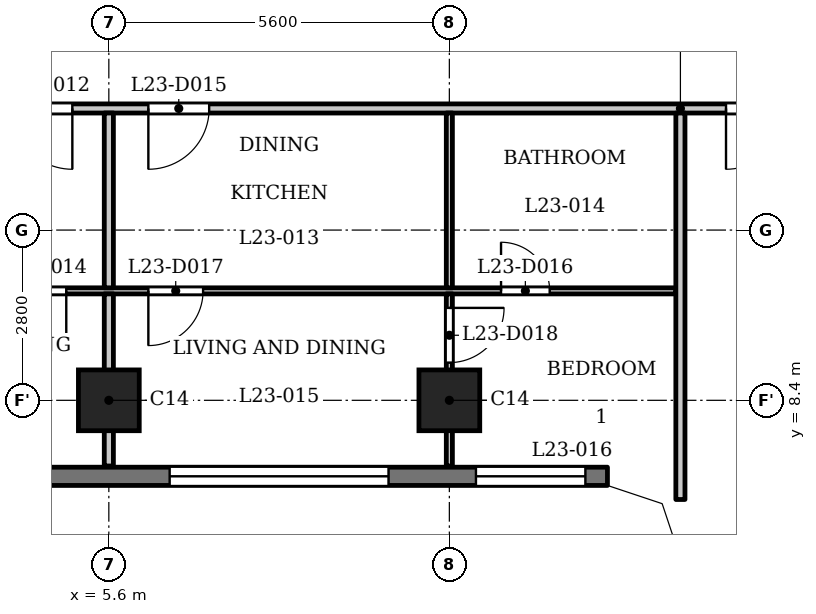
"""IFC4 building model, lengths in metres.
Left out: names, types, materials, properties, quantities, classifications, styles, units other than length and angle.
Written with IfcOpenShell. Run it as: python <this file> out.ifc"""

import sys

from ifc_helpers import new_model, si_unit, direction, frame, frame_2d, origin, origin_2d, place, context, subcontext, project, spatial, polyline, rectangle, outline, extrude, element, fill, save


model = new_model("IFC4")
c1 = context("Model", 3, precision=1e-05, world=origin(), true_north=direction((0.0, 1.0)))
c2 = subcontext(c1, "Body", "Model", "MODEL_VIEW")
j1 = project(units=[si_unit("LENGTHUNIT", "METRE"), si_unit("PLANEANGLEUNIT", "RADIAN")], contexts=[c1])
p1 = place(None, origin())
s1 = spatial("IfcSite", under=j1, at=p1, CompositionType="ELEMENT")
p2 = place(p1, origin())
s2 = spatial("IfcBuilding", under=s1, at=p2, CompositionType="ELEMENT")
p3 = place(p2, frame((0.0, 0.0, 93.8)))
s3 = spatial("IfcBuildingStorey", under=s2, at=p3, CompositionType="ELEMENT", Elevation=93.8)
for number, where, z_axis, x_axis in (
    (1, (5.6, 8.4, 0.0), (0.0, 0.0, 1.0), (1.0, 0.0, 0.0)),
    (2, (11.2, 8.4, 0.0), (0.0, 0.0, 1.0), (1.0, 0.0, 0.0)),
):
    element("IfcColumn", number, at=place(p3, frame(where, z_axis=z_axis, x_axis=x_axis)), inside=s3, PredefinedType="COLUMN", context=c2, shape_type="SweptSolid", body=[
        extrude(rectangle(XDim=1.0, YDim=1.0, at=origin_2d()), origin(), (0.0, 0.0, 1.0), 3.5),
    ])
p4 = place(p3, frame((-13.8, 7.15, 0.0), z_axis=(0.0, 0.0, 1.0), x_axis=(1.0, 0.0, 0.0)))
e3 = element("IfcWall", 3, at=p4, inside=s3, PredefinedType="SOLIDWALL", context=c2, shape_type="SweptSolid", body=[
    extrude(rectangle(XDim=27.6, YDim=0.3, at=frame_2d((13.8, 0.0))), origin(), (0.0, 0.0, 1.0), 3.2),
])
p5 = place(p4, frame((0.363, 0.0, 0.9)))
e4 = element("IfcOpeningElement", 4, at=p5, cuts=e3, PredefinedType="OPENING", context=c2, shape_type="SweptSolid", body=[
    extrude(rectangle(XDim=1.8, YDim=1.25, at=frame_2d((0.9, 0.625))), frame((0.0, 0.16, 0.0), z_axis=(0.0, -1.0, 0.0), x_axis=(1.0, 0.0, 0.0)), (0.0, 0.0, 1.0), 0.32),
])
p6 = place(p4, frame((3.6, 0.0, 1.2)))
e5 = element("IfcOpeningElement", 5, at=p6, cuts=e3, PredefinedType="OPENING", context=c2, shape_type="SweptSolid", body=[
    extrude(rectangle(XDim=3.6, YDim=0.95, at=frame_2d((1.8, 0.475))), frame((0.0, 0.16, 0.0), z_axis=(0.0, -1.0, 0.0), x_axis=(1.0, 0.0, 0.0)), (0.0, 0.0, 1.0), 0.32),
])
p7 = place(p4, frame((9.2, 0.0, 1.2)))
e6 = element("IfcOpeningElement", 6, at=p7, cuts=e3, PredefinedType="OPENING", context=c2, shape_type="SweptSolid", body=[
    extrude(rectangle(XDim=3.6, YDim=0.95, at=frame_2d((1.8, 0.475))), frame((0.0, 0.16, 0.0), z_axis=(0.0, -1.0, 0.0), x_axis=(1.0, 0.0, 0.0)), (0.0, 0.0, 1.0), 0.32),
])
p8 = place(p4, frame((14.8, 0.0, 1.2)))
e7 = element("IfcOpeningElement", 7, at=p8, cuts=e3, PredefinedType="OPENING", context=c2, shape_type="SweptSolid", body=[
    extrude(rectangle(XDim=3.6, YDim=0.95, at=frame_2d((1.8, 0.475))), frame((0.0, 0.16, 0.0), z_axis=(0.0, -1.0, 0.0), x_axis=(1.0, 0.0, 0.0)), (0.0, 0.0, 1.0), 0.32),
])
p9 = place(p4, frame((20.4, 0.0, 1.2)))
e8 = element("IfcOpeningElement", 8, at=p9, cuts=e3, PredefinedType="OPENING", context=c2, shape_type="SweptSolid", body=[
    extrude(rectangle(XDim=3.6, YDim=0.95, at=frame_2d((1.8, 0.475))), frame((0.0, 0.16, 0.0), z_axis=(0.0, -1.0, 0.0), x_axis=(1.0, 0.0, 0.0)), (0.0, 0.0, 1.0), 0.32),
])
p10 = place(p4, frame((25.438, 0.0, 0.9)))
e9 = element("IfcOpeningElement", 9, at=p10, cuts=e3, PredefinedType="OPENING", context=c2, shape_type="SweptSolid", body=[
    extrude(rectangle(XDim=1.8, YDim=1.25, at=frame_2d((0.9, 0.625))), frame((0.0, 0.16, 0.0), z_axis=(0.0, -1.0, 0.0), x_axis=(1.0, 0.0, 0.0)), (0.0, 0.0, 1.0), 0.32),
])
p11 = place(p3, frame((-14.925, 10.2, 0.0), z_axis=(0.0, 0.0, 1.0), x_axis=(1.0, 0.0, 0.0)))
e10 = element("IfcWall", 10, at=p11, inside=s3, PredefinedType="PARTITIONING", context=c2, shape_type="SweptSolid", body=[
    extrude(rectangle(XDim=29.85, YDim=0.1, at=frame_2d((14.925, 0.0))), origin(), (0.0, 0.0, 1.0), 3.2),
])
p12 = place(p11, frame((0.525, 0.0, 0.0)))
e11 = element("IfcOpeningElement", 11, at=p12, cuts=e10, PredefinedType="OPENING", context=c2, shape_type="SweptSolid", body=[
    extrude(rectangle(XDim=0.8, YDim=2.1, at=frame_2d((0.4, 1.05))), frame((0.0, 0.06, 0.0), z_axis=(0.0, -1.0, 0.0), x_axis=(1.0, 0.0, 0.0)), (0.0, 0.0, 1.0), 0.12),
])
p13 = place(p11, frame((4.375, 0.0, 0.0)))
e12 = element("IfcOpeningElement", 12, at=p13, cuts=e10, PredefinedType="OPENING", context=c2, shape_type="SweptSolid", body=[
    extrude(rectangle(XDim=0.9, YDim=2.1, at=frame_2d((0.45, 1.05))), frame((0.0, 0.06, 0.0), z_axis=(0.0, -1.0, 0.0), x_axis=(1.0, 0.0, 0.0)), (0.0, 0.0, 1.0), 0.12),
])
p14 = place(p11, frame((10.125, 0.0, 0.0)))
e13 = element("IfcOpeningElement", 13, at=p14, cuts=e10, PredefinedType="OPENING", context=c2, shape_type="SweptSolid", body=[
    extrude(rectangle(XDim=0.8, YDim=2.1, at=frame_2d((0.4, 1.05))), frame((0.0, 0.06, 0.0), z_axis=(0.0, -1.0, 0.0), x_axis=(1.0, 0.0, 0.0)), (0.0, 0.0, 1.0), 0.12),
])
p15 = place(p11, frame((12.975, 0.0, 0.0)))
e14 = element("IfcOpeningElement", 14, at=p15, cuts=e10, PredefinedType="OPENING", context=c2, shape_type="SweptSolid", body=[
    extrude(rectangle(XDim=0.9, YDim=2.1, at=frame_2d((0.45, 1.05))), frame((0.0, 0.06, 0.0), z_axis=(0.0, -1.0, 0.0), x_axis=(1.0, 0.0, 0.0)), (0.0, 0.0, 1.0), 0.12),
])
p16 = place(p11, frame((16.075, 0.0, 0.0)))
e15 = element("IfcOpeningElement", 15, at=p16, cuts=e10, PredefinedType="OPENING", context=c2, shape_type="SweptSolid", body=[
    extrude(rectangle(XDim=0.8, YDim=2.1, at=frame_2d((0.4, 1.05))), frame((0.0, 0.06, 0.0), z_axis=(0.0, -1.0, 0.0), x_axis=(1.0, 0.0, 0.0)), (0.0, 0.0, 1.0), 0.12),
])
p17 = place(p11, frame((18.925, 0.0, 0.0)))
e16 = element("IfcOpeningElement", 16, at=p17, cuts=e10, PredefinedType="OPENING", context=c2, shape_type="SweptSolid", body=[
    extrude(rectangle(XDim=0.9, YDim=2.1, at=frame_2d((0.45, 1.05))), frame((0.0, 0.06, 0.0), z_axis=(0.0, -1.0, 0.0), x_axis=(1.0, 0.0, 0.0)), (0.0, 0.0, 1.0), 0.12),
])
p18 = place(p11, frame((26.975, 0.0, 0.0)))
e17 = element("IfcOpeningElement", 17, at=p18, cuts=e10, PredefinedType="OPENING", context=c2, shape_type="SweptSolid", body=[
    extrude(rectangle(XDim=0.8, YDim=2.1, at=frame_2d((0.4, 1.05))), frame((0.0, 0.06, 0.0), z_axis=(0.0, -1.0, 0.0), x_axis=(1.0, 0.0, 0.0)), (0.0, 0.0, 1.0), 0.12),
])
p19 = place(p11, frame((21.175, 0.0, 0.0)))
e18 = element("IfcOpeningElement", 18, at=p19, cuts=e10, PredefinedType="OPENING", context=c2, shape_type="SweptSolid", body=[
    extrude(rectangle(XDim=0.9, YDim=2.1, at=frame_2d((0.45, 1.05))), frame((0.0, 0.06, 0.0), z_axis=(0.0, -1.0, 0.0), x_axis=(1.0, 0.0, 0.0)), (0.0, 0.0, 1.0), 0.12),
])
p20 = place(p3, frame((-17.4, 13.2, 0.0), z_axis=(0.0, 0.0, 1.0), x_axis=(1.0, 0.0, 0.0)))
e19 = element("IfcWall", 19, at=p20, inside=s3, PredefinedType="PARTITIONING", context=c2, shape_type="SweptSolid", body=[
    extrude(rectangle(XDim=34.8, YDim=0.15, at=frame_2d((17.4, 0.0))), origin(), (0.0, 0.0, 1.0), 3.2),
])
p21 = place(p20, frame((0.75, 0.0, 0.0)))
e20 = element("IfcOpeningElement", 20, at=p21, cuts=e19, PredefinedType="OPENING", context=c2, shape_type="SweptSolid", body=[
    extrude(rectangle(XDim=1.0, YDim=2.1, at=frame_2d((0.5, 1.05))), frame((0.0, 0.085, 0.0), z_axis=(0.0, -1.0, 0.0), x_axis=(1.0, 0.0, 0.0)), (0.0, 0.0, 1.0), 0.17),
])
p22 = place(p20, frame((33.15, 0.0, 0.0)))
e21 = element("IfcOpeningElement", 21, at=p22, cuts=e19, PredefinedType="OPENING", context=c2, shape_type="SweptSolid", body=[
    extrude(rectangle(XDim=1.0, YDim=2.1, at=frame_2d((0.5, 1.05))), frame((0.0, 0.085, 0.0), z_axis=(0.0, -1.0, 0.0), x_axis=(1.0, 0.0, 0.0)), (0.0, 0.0, 1.0), 0.17),
])
p23 = place(p20, frame((6.85, 0.0, 0.0)))
e22 = element("IfcOpeningElement", 22, at=p23, cuts=e19, PredefinedType="OPENING", context=c2, shape_type="SweptSolid", body=[
    extrude(rectangle(XDim=1.0, YDim=2.1, at=frame_2d((0.5, 1.05))), frame((0.0, 0.085, 0.0), z_axis=(0.0, -1.0, 0.0), x_axis=(1.0, 0.0, 0.0)), (0.0, 0.0, 1.0), 0.17),
])
p24 = place(p20, frame((15.45, 0.0, 0.0)))
e23 = element("IfcOpeningElement", 23, at=p24, cuts=e19, PredefinedType="OPENING", context=c2, shape_type="SweptSolid", body=[
    extrude(rectangle(XDim=1.0, YDim=2.1, at=frame_2d((0.5, 1.05))), frame((0.0, 0.085, 0.0), z_axis=(0.0, -1.0, 0.0), x_axis=(1.0, 0.0, 0.0)), (0.0, 0.0, 1.0), 0.17),
])
p25 = place(p20, frame((21.4, 0.0, 0.0)))
e24 = element("IfcOpeningElement", 24, at=p25, cuts=e19, PredefinedType="OPENING", context=c2, shape_type="SweptSolid", body=[
    extrude(rectangle(XDim=1.0, YDim=2.1, at=frame_2d((0.5, 1.05))), frame((0.0, 0.085, 0.0), z_axis=(0.0, -1.0, 0.0), x_axis=(1.0, 0.0, 0.0)), (0.0, 0.0, 1.0), 0.17),
])
p26 = place(p20, frame((23.65, 0.0, 0.0)))
e25 = element("IfcOpeningElement", 25, at=p26, cuts=e19, PredefinedType="OPENING", context=c2, shape_type="SweptSolid", body=[
    extrude(rectangle(XDim=1.0, YDim=2.1, at=frame_2d((0.5, 1.05))), frame((0.0, 0.085, 0.0), z_axis=(0.0, -1.0, 0.0), x_axis=(1.0, 0.0, 0.0)), (0.0, 0.0, 1.0), 0.17),
])
p27 = place(p3, frame((5.6, 7.32, 0.0), z_axis=(0.0, 0.0, 1.0), x_axis=(0.0, 1.0, 0.0)))
e26 = element("IfcWall", 26, at=p27, inside=s3, PredefinedType="PARTITIONING", context=c2, shape_type="SweptSolid", body=[
    extrude(rectangle(XDim=2.83, YDim=0.15, at=frame_2d((1.415, 0.0))), origin(), (0.0, 0.0, 1.0), 3.2),
])
p28 = place(p3, frame((5.6, 10.25, 0.0), z_axis=(0.0, 0.0, 1.0), x_axis=(0.0, 1.0, 0.0)))
e27 = element("IfcWall", 27, at=p28, inside=s3, PredefinedType="PARTITIONING", context=c2, shape_type="SweptSolid", body=[
    extrude(rectangle(XDim=2.875, YDim=0.15, at=frame_2d((1.438, 0.0))), origin(), (0.0, 0.0, 1.0), 3.2),
])
p29 = place(p3, frame((11.2, 7.32, 0.0), z_axis=(0.0, 0.0, 1.0), x_axis=(0.0, 1.0, 0.0)))
e28 = element("IfcWall", 28, at=p29, inside=s3, PredefinedType="PARTITIONING", context=c2, shape_type="SweptSolid", body=[
    extrude(rectangle(XDim=2.83, YDim=0.1, at=frame_2d((1.415, 0.0))), origin(), (0.0, 0.0, 1.0), 3.2),
])
p30 = place(p29, frame((1.7, 0.0, 0.0)))
e29 = element("IfcOpeningElement", 29, at=p30, cuts=e28, PredefinedType="OPENING", context=c2, shape_type="SweptSolid", body=[
    extrude(rectangle(XDim=0.9, YDim=2.1, at=frame_2d((0.45, 1.05))), frame((0.0, 0.06, 0.0), z_axis=(0.0, -1.0, 0.0), x_axis=(1.0, 0.0, 0.0)), (0.0, 0.0, 1.0), 0.12),
])
p31 = place(p3, frame((11.2, 10.25, 0.0), z_axis=(0.0, 0.0, 1.0), x_axis=(0.0, 1.0, 0.0)))
e30 = element("IfcWall", 30, at=p31, inside=s3, PredefinedType="PARTITIONING", context=c2, shape_type="SweptSolid", body=[
    extrude(rectangle(XDim=2.875, YDim=0.1, at=frame_2d((1.438, 0.0))), origin(), (0.0, 0.0, 1.0), 3.2),
])
p32 = place(p3, frame((15.0, 6.769, 0.0), z_axis=(0.0, 0.0, 1.0), x_axis=(0.0, 1.0, 0.0)))
e31 = element("IfcWall", 31, at=p32, inside=s3, PredefinedType="PARTITIONING", context=c2, shape_type="SweptSolid", body=[
    extrude(rectangle(XDim=6.356, YDim=0.15, at=frame_2d((3.178, 0.0))), origin(), (0.0, 0.0, 1.0), 3.2),
])
p33 = place(p3, origin())
e32 = element("IfcWall", 32, at=p33, inside=s3, PredefinedType="SOLIDWALL", context=c2, shape_type="SweptSolid", body=[
    extrude(outline(polyline([(14.937, 6.937), (13.849, 7.3), (13.8, 7.3), (13.8, 7.0), (14.7, 6.7), (15.0, 5.8), (15.3, 5.8), (15.3, 5.849), (14.937, 6.937)])), origin(), (0.0, 0.0, 1.0), 3.2),
])
p34 = place(p22, origin())
e33 = element("IfcDoor", 33, at=p34, inside=s3, OperationType="SINGLE_SWING_LEFT", PredefinedType="DOOR", context=c2, shape_type="SweptSolid", body=[
    extrude(rectangle(XDim=1.0, YDim=2.1, at=frame_2d((0.5, 1.05))), frame((0.0, 0.025, 0.0), z_axis=(0.0, -1.0, 0.0), x_axis=(1.0, 0.0, 0.0)), (0.0, 0.0, 1.0), 0.05),
])
fill(e21, e33)
p35 = place(p25, origin())
e34 = element("IfcDoor", 34, at=p35, inside=s3, OperationType="SINGLE_SWING_RIGHT", PredefinedType="DOOR", context=c2, shape_type="SweptSolid", body=[
    extrude(rectangle(XDim=1.0, YDim=2.1, at=frame_2d((0.5, 1.05))), frame((0.0, 0.025, 0.0), z_axis=(0.0, -1.0, 0.0), x_axis=(1.0, 0.0, 0.0)), (0.0, 0.0, 1.0), 0.05),
])
fill(e24, e34)
p36 = place(p17, origin())
e35 = element("IfcDoor", 35, at=p36, inside=s3, OperationType="SINGLE_SWING_RIGHT", PredefinedType="DOOR", context=c2, shape_type="SweptSolid", body=[
    extrude(rectangle(XDim=0.9, YDim=2.1, at=frame_2d((0.45, 1.05))), frame((0.0, 0.025, 0.0), z_axis=(0.0, -1.0, 0.0), x_axis=(1.0, 0.0, 0.0)), (0.0, 0.0, 1.0), 0.05),
])
fill(e16, e35)
p37 = place(p26, origin())
e36 = element("IfcDoor", 36, at=p37, inside=s3, OperationType="SINGLE_SWING_LEFT", PredefinedType="DOOR", context=c2, shape_type="SweptSolid", body=[
    extrude(rectangle(XDim=1.0, YDim=2.1, at=frame_2d((0.5, 1.05))), frame((0.0, 0.025, 0.0), z_axis=(0.0, -1.0, 0.0), x_axis=(1.0, 0.0, 0.0)), (0.0, 0.0, 1.0), 0.05),
])
fill(e25, e36)
p38 = place(p18, origin())
e37 = element("IfcDoor", 37, at=p38, inside=s3, OperationType="SINGLE_SWING_RIGHT", PredefinedType="DOOR", context=c2, shape_type="SweptSolid", body=[
    extrude(rectangle(XDim=0.8, YDim=2.1, at=frame_2d((0.4, 1.05))), frame((0.0, 0.025, 0.0), z_axis=(0.0, -1.0, 0.0), x_axis=(1.0, 0.0, 0.0)), (0.0, 0.0, 1.0), 0.05),
])
fill(e17, e37)
p39 = place(p19, origin())
e38 = element("IfcDoor", 38, at=p39, inside=s3, OperationType="SINGLE_SWING_LEFT", PredefinedType="DOOR", context=c2, shape_type="SweptSolid", body=[
    extrude(rectangle(XDim=0.9, YDim=2.1, at=frame_2d((0.45, 1.05))), frame((0.0, 0.025, 0.0), z_axis=(0.0, -1.0, 0.0), x_axis=(1.0, 0.0, 0.0)), (0.0, 0.0, 1.0), 0.05),
])
fill(e18, e38)
p40 = place(p30, origin())
e39 = element("IfcDoor", 39, at=p40, inside=s3, OperationType="SINGLE_SWING_RIGHT", PredefinedType="DOOR", context=c2, shape_type="SweptSolid", body=[
    extrude(rectangle(XDim=0.9, YDim=2.1, at=frame_2d((0.45, 1.05))), frame((0.0, 0.025, 0.0), z_axis=(0.0, -1.0, 0.0), x_axis=(1.0, 0.0, 0.0)), (0.0, 0.0, 1.0), 0.05),
])
fill(e29, e39)
p41 = place(p9, origin())
e40 = element("IfcWindow", 40, at=p41, inside=s3, PartitioningType="SINGLE_PANEL", PredefinedType="WINDOW", context=c2, shape_type="SweptSolid", body=[
    extrude(rectangle(XDim=3.6, YDim=0.95, at=frame_2d((1.8, 0.475))), frame((0.0, 0.03, 0.0), z_axis=(0.0, -1.0, 0.0), x_axis=(1.0, 0.0, 0.0)), (0.0, 0.0, 1.0), 0.06),
])
fill(e8, e40)
p42 = place(p10, origin())
e41 = element("IfcWindow", 41, at=p42, inside=s3, PartitioningType="SINGLE_PANEL", PredefinedType="WINDOW", context=c2, shape_type="SweptSolid", body=[
    extrude(rectangle(XDim=1.8, YDim=1.25, at=frame_2d((0.9, 0.625))), frame((0.0, 0.03, 0.0), z_axis=(0.0, -1.0, 0.0), x_axis=(1.0, 0.0, 0.0)), (0.0, 0.0, 1.0), 0.06),
])
fill(e9, e41)
save(model, sys.argv[1])
